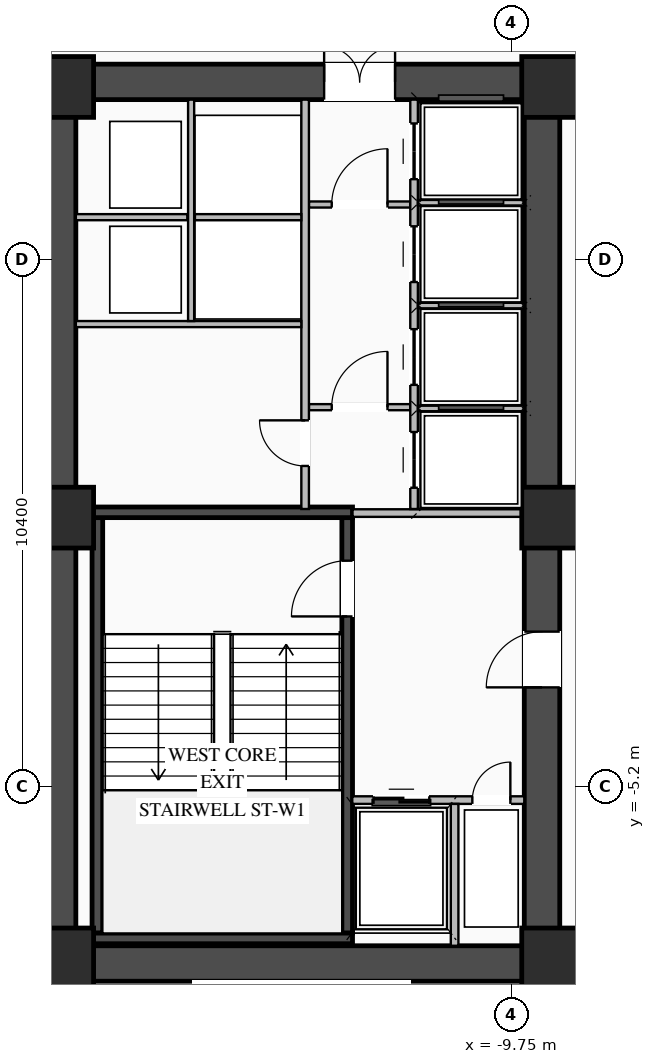
"""IFC4 building model, lengths in metres.
Left out: names, types, materials, properties, quantities, classifications, styles, units other than length and angle.
Written with IfcOpenShell. Run it as: python <this file> out.ifc"""

import sys

from ifc_helpers import new_model, si_unit, direction, frame, frame_2d, origin, origin_2d, place, context, subcontext, project, spatial, rectangle, extrude, element, fill, save


model = new_model("IFC4")
c1 = context("Model", 3, precision=1e-05, world=origin(), true_north=direction((0.0, 1.0)))
c2 = subcontext(c1, "Body", "Model", "MODEL_VIEW")
j1 = project(units=[si_unit("LENGTHUNIT", "METRE"), si_unit("PLANEANGLEUNIT", "RADIAN")], contexts=[c1])
p1 = place(None, origin())
s1 = spatial("IfcSite", under=j1, at=p1, CompositionType="ELEMENT")
p2 = place(p1, origin())
s2 = spatial("IfcBuilding", under=s1, at=p2, CompositionType="ELEMENT")
p3 = place(p2, frame((0.0, 0.0, 22.8)))
s3 = spatial("IfcBuildingStorey", under=s2, at=p3, CompositionType="ELEMENT", Elevation=22.8)
p4 = place(p3, frame((-19.05, -8.7, 0.0), z_axis=(0.0, 0.0, 1.0), x_axis=(1.0, 0.0, 0.0)))
e1 = element("IfcWall", 1, at=p4, inside=s3, PredefinedType="SHEAR", context=c2, shape_type="SweptSolid", body=[
    extrude(rectangle(XDim=10.25, YDim=0.7, at=frame_2d((5.125, 0.0))), origin(), (0.0, 0.0, 1.0), 3.92),
])
p5 = place(p3, frame((-19.05, 8.7, 0.0), z_axis=(0.0, 0.0, 1.0), x_axis=(1.0, 0.0, 0.0)))
e2 = element("IfcWall", 2, at=p5, inside=s3, PredefinedType="SHEAR", context=c2, shape_type="SweptSolid", body=[
    extrude(rectangle(XDim=10.25, YDim=0.7, at=frame_2d((5.125, 0.0))), origin(), (0.0, 0.0, 1.0), 3.92),
])
p6 = place(p5, frame((5.6, 0.0, 0.0)))
e3 = element("IfcOpeningElement", 3, at=p6, cuts=e2, PredefinedType="OPENING", context=c2, shape_type="SweptSolid", body=[
    extrude(rectangle(XDim=1.4, YDim=2.05, at=frame_2d((0.7, 1.025))), frame((0.0, 0.36, 0.0), z_axis=(0.0, -1.0, 0.0), x_axis=(1.0, 0.0, 0.0)), (0.0, 0.0, 1.0), 0.72),
])
p7 = place(p3, frame((-18.7, -8.35, 0.0), z_axis=(0.0, 0.0, 1.0), x_axis=(0.0, 1.0, 0.0)))
e4 = element("IfcWall", 4, at=p7, inside=s3, PredefinedType="SHEAR", context=c2, shape_type="SweptSolid", body=[
    extrude(rectangle(XDim=16.7, YDim=0.7, at=frame_2d((8.35, 0.0))), origin(), (0.0, 0.0, 1.0), 3.92),
])
p8 = place(p3, frame((-9.15, -8.35, 0.0), z_axis=(0.0, 0.0, 1.0), x_axis=(0.0, 1.0, 0.0)))
e5 = element("IfcWall", 5, at=p8, inside=s3, PredefinedType="SHEAR", context=c2, shape_type="SweptSolid", body=[
    extrude(rectangle(XDim=16.7, YDim=0.7, at=frame_2d((8.35, 0.0))), origin(), (0.0, 0.0, 1.0), 3.92),
])
p9 = place(p8, frame((5.1, 0.0, 0.0)))
e6 = element("IfcOpeningElement", 6, at=p9, cuts=e5, PredefinedType="OPENING", context=c2, shape_type="SweptSolid", body=[
    extrude(rectangle(XDim=1.1, YDim=2.08, at=frame_2d((0.55, 1.04))), frame((0.0, 0.36, 0.0), z_axis=(0.0, -1.0, 0.0), x_axis=(1.0, 0.0, 0.0)), (0.0, 0.0, 1.0), 0.72),
])
p10 = place(p3, frame((-12.995, -8.1, 0.0), z_axis=(0.0, 0.0, 1.0), x_axis=(0.0, 1.0, 0.0)))
e7 = element("IfcWall", 7, at=p10, inside=s3, PredefinedType="SHEAR", context=c2, shape_type="SweptSolid", body=[
    extrude(rectangle(XDim=8.2, YDim=0.21, at=frame_2d((4.1, 0.0))), origin(), (0.0, 0.0, 1.0), 3.92),
])
p11 = place(p10, frame((6.25, 0.0, 0.0)))
e8 = element("IfcOpeningElement", 8, at=p11, cuts=e7, PredefinedType="OPENING", context=c2, shape_type="SweptSolid", body=[
    extrude(rectangle(XDim=1.1, YDim=2.15, at=frame_2d((0.55, 1.075))), frame((0.0, 0.115, 0.0), z_axis=(0.0, -1.0, 0.0), x_axis=(1.0, 0.0, 0.0)), (0.0, 0.0, 1.0), 0.23),
])
p12 = place(p3, frame((-17.925, -8.1, 0.0), z_axis=(0.0, 0.0, 1.0), x_axis=(0.0, 1.0, 0.0)))
e9 = element("IfcWall", 9, at=p12, inside=s3, PredefinedType="SHEAR", context=c2, shape_type="SweptSolid", body=[
    extrude(rectangle(XDim=8.2, YDim=0.21, at=frame_2d((4.1, 0.0))), origin(), (0.0, 0.0, 1.0), 3.92),
])
for number, where, z_axis, x_axis in (
    (10, (-18.03, -8.205, 0.0), (0.0, 0.0, 1.0), (1.0, 0.0, 0.0)),
    (11, (-12.89, 0.205, 0.0), (0.0, 0.0, 1.0), (-1.0, 0.0, 0.0)),
):
    element("IfcWall", number, at=place(p3, frame(where, z_axis=z_axis, x_axis=x_axis)), inside=s3, PredefinedType="SHEAR", context=c2, shape_type="SweptSolid", body=[
        extrude(rectangle(XDim=5.14, YDim=0.21, at=frame_2d((2.57, 0.0))), origin(), (0.0, 0.0, 1.0), 3.92),
    ])
for number, where, z_axis, x_axis in (
    (12, (-8.95, -8.6, 0.0), (0.0, 0.0, 1.0), (1.0, 0.0, 0.0)),
    (13, (-8.95, 0.1, 0.0), (0.0, 0.0, 1.0), (1.0, 0.0, 0.0)),
    (14, (-8.95, 8.6, 0.0), (0.0, 0.0, 1.0), (1.0, 0.0, 0.0)),
    (15, (-18.6, -8.6, 0.0), (0.0, 0.0, 1.0), (1.0, 0.0, 0.0)),
    (16, (-18.6, 0.1, 0.0), (0.0, 0.0, 1.0), (1.0, 0.0, 0.0)),
    (17, (-18.6, 8.6, 0.0), (0.0, 0.0, 1.0), (1.0, 0.0, 0.0)),
):
    element("IfcColumn", number, at=place(p3, frame(where, z_axis=z_axis, x_axis=x_axis)), inside=s3, PredefinedType="COLUMN", context=c2, shape_type="SweptSolid", body=[
        extrude(rectangle(XDim=1.2, YDim=1.2, at=origin_2d()), origin(), (0.0, 0.0, 1.0), 4.2),
    ])
p13 = place(p3, frame((-12.895, -5.475, 0.0), z_axis=(0.0, 0.0, 1.0), x_axis=(1.0, 0.0, 0.0)))
e18 = element("IfcWall", 18, at=p13, inside=s3, PredefinedType="STANDARD", context=c2, shape_type="SweptSolid", body=[
    extrude(rectangle(XDim=3.395, YDim=0.15, at=frame_2d((1.698, 0.0))), origin(), (0.0, 0.0, 1.0), 3.9),
])
p14 = place(p13, frame((0.42, 0.0, 0.0)))
e19 = element("IfcOpeningElement", 19, at=p14, cuts=e18, PredefinedType="OPENING", context=c2, shape_type="SweptSolid", body=[
    extrude(rectangle(XDim=1.1, YDim=2.15, at=frame_2d((0.55, 1.075))), frame((0.0, 0.085, 0.0), z_axis=(0.0, -1.0, 0.0), x_axis=(1.0, 0.0, 0.0)), (0.0, 0.0, 1.0), 0.17),
])
p15 = place(p13, frame((2.37, 0.0, 0.0)))
e20 = element("IfcOpeningElement", 20, at=p15, cuts=e18, PredefinedType="OPENING", context=c2, shape_type="SweptSolid", body=[
    extrude(rectangle(XDim=0.75, YDim=2.05, at=frame_2d((0.375, 1.025))), frame((0.0, 0.085, 0.0), z_axis=(0.0, -1.0, 0.0), x_axis=(1.0, 0.0, 0.0)), (0.0, 0.0, 1.0), 0.17),
])
p16 = place(p3, frame((-10.875, -8.35, 0.0), z_axis=(0.0, 0.0, 1.0), x_axis=(0.0, 1.0, 0.0)))
e21 = element("IfcWall", 21, at=p16, inside=s3, PredefinedType="STANDARD", context=c2, shape_type="SweptSolid", body=[
    extrude(rectangle(XDim=2.8, YDim=0.15, at=frame_2d((1.4, 0.0))), origin(), (0.0, 0.0, 1.0), 3.9),
])
p17 = place(p3, frame((-12.89, 0.19, 0.0), z_axis=(0.0, 0.0, 1.0), x_axis=(1.0, 0.0, 0.0)))
e22 = element("IfcWall", 22, at=p17, inside=s3, PredefinedType="STANDARD", context=c2, shape_type="SweptSolid", body=[
    extrude(rectangle(XDim=3.39, YDim=0.15, at=frame_2d((1.695, 0.0))), origin(), (0.0, 0.0, 1.0), 3.295),
])
p18 = place(p3, frame((-13.75, 2.28, 0.0), z_axis=(0.0, 0.0, 1.0), x_axis=(1.0, 0.0, 0.0)))
e23 = element("IfcWall", 23, at=p18, inside=s3, PredefinedType="STANDARD", context=c2, shape_type="SweptSolid", body=[
    extrude(rectangle(XDim=2.0, YDim=0.12, at=frame_2d((1.0, 0.0))), origin(), (0.0, 0.0, 1.0), 3.9),
])
p19 = place(p18, frame((0.45, 0.0, 0.0)))
e24 = element("IfcOpeningElement", 24, at=p19, cuts=e23, PredefinedType="OPENING", context=c2, shape_type="SweptSolid", body=[
    extrude(rectangle(XDim=1.1, YDim=2.1, at=frame_2d((0.55, 1.05))), frame((0.0, 0.07, 0.0), z_axis=(0.0, -1.0, 0.0), x_axis=(1.0, 0.0, 0.0)), (0.0, 0.0, 1.0), 0.14),
])
p20 = place(p3, frame((-13.75, 6.28, 0.0), z_axis=(0.0, 0.0, 1.0), x_axis=(1.0, 0.0, 0.0)))
e25 = element("IfcWall", 25, at=p20, inside=s3, PredefinedType="STANDARD", context=c2, shape_type="SweptSolid", body=[
    extrude(rectangle(XDim=2.0, YDim=0.12, at=frame_2d((1.0, 0.0))), origin(), (0.0, 0.0, 1.0), 3.9),
])
p21 = place(p20, frame((0.45, 0.0, 0.0)))
e26 = element("IfcOpeningElement", 26, at=p21, cuts=e25, PredefinedType="OPENING", context=c2, shape_type="SweptSolid", body=[
    extrude(rectangle(XDim=1.1, YDim=2.1, at=frame_2d((0.55, 1.05))), frame((0.0, 0.07, 0.0), z_axis=(0.0, -1.0, 0.0), x_axis=(1.0, 0.0, 0.0)), (0.0, 0.0, 1.0), 0.14),
])
p22 = place(p3, frame((-11.675, 0.27, 0.0), z_axis=(0.0, 0.0, 1.0), x_axis=(0.0, 1.0, 0.0)))
e27 = element("IfcWall", 27, at=p22, inside=s3, PredefinedType="STANDARD", context=c2, shape_type="SweptSolid", body=[
    extrude(rectangle(XDim=8.08, YDim=0.15, at=frame_2d((4.04, 0.0))), origin(), (0.0, 0.0, 1.0), 3.9),
])
p23 = place(p22, frame((0.42, 0.0, 0.0)))
e28 = element("IfcOpeningElement", 28, at=p23, cuts=e27, PredefinedType="OPENING", context=c2, shape_type="SweptSolid", body=[
    extrude(rectangle(XDim=1.1, YDim=2.1, at=frame_2d((0.55, 1.05))), frame((0.0, 0.085, 0.0), z_axis=(0.0, -1.0, 0.0), x_axis=(1.0, 0.0, 0.0)), (0.0, 0.0, 1.0), 0.17),
])
p24 = place(p22, frame((2.45, 0.0, 0.0)))
e29 = element("IfcOpeningElement", 29, at=p24, cuts=e27, PredefinedType="OPENING", context=c2, shape_type="SweptSolid", body=[
    extrude(rectangle(XDim=1.1, YDim=2.1, at=frame_2d((0.55, 1.05))), frame((0.0, 0.085, 0.0), z_axis=(0.0, -1.0, 0.0), x_axis=(1.0, 0.0, 0.0)), (0.0, 0.0, 1.0), 0.17),
])
p25 = place(p22, frame((4.48, 0.0, 0.0)))
e30 = element("IfcOpeningElement", 30, at=p25, cuts=e27, PredefinedType="OPENING", context=c2, shape_type="SweptSolid", body=[
    extrude(rectangle(XDim=1.1, YDim=2.1, at=frame_2d((0.55, 1.05))), frame((0.0, 0.085, 0.0), z_axis=(0.0, -1.0, 0.0), x_axis=(1.0, 0.0, 0.0)), (0.0, 0.0, 1.0), 0.17),
])
p26 = place(p22, frame((6.51, 0.0, 0.0)))
e31 = element("IfcOpeningElement", 31, at=p26, cuts=e27, PredefinedType="OPENING", context=c2, shape_type="SweptSolid", body=[
    extrude(rectangle(XDim=1.1, YDim=2.1, at=frame_2d((0.55, 1.05))), frame((0.0, 0.085, 0.0), z_axis=(0.0, -1.0, 0.0), x_axis=(1.0, 0.0, 0.0)), (0.0, 0.0, 1.0), 0.17),
])
for number, where, z_axis, x_axis in (
    (32, (-11.6, 2.255, 0.0), (0.0, 0.0, 1.0), (1.0, 0.0, 0.0)),
    (33, (-11.6, 4.285, 0.0), (0.0, 0.0, 1.0), (1.0, 0.0, 0.0)),
    (34, (-11.6, 6.315, 0.0), (0.0, 0.0, 1.0), (1.0, 0.0, 0.0)),
):
    element("IfcWall", number, at=place(p3, frame(where, z_axis=z_axis, x_axis=x_axis)), inside=s3, PredefinedType="STANDARD", context=c2, shape_type="SweptSolid", body=[
        extrude(rectangle(XDim=2.1, YDim=0.11, at=frame_2d((1.05, 0.0))), origin(), (0.0, 0.0, 1.0), 3.9),
    ])
p27 = place(p3, frame((-13.825, 0.27, 0.0), z_axis=(0.0, 0.0, 1.0), x_axis=(0.0, 1.0, 0.0)))
e35 = element("IfcWall", 35, at=p27, inside=s3, PredefinedType="STANDARD", context=c2, shape_type="SweptSolid", body=[
    extrude(rectangle(XDim=8.08, YDim=0.15, at=frame_2d((4.04, 0.0))), origin(), (0.0, 0.0, 1.0), 3.9),
])
p28 = place(p27, frame((0.85, 0.0, 0.0)))
e36 = element("IfcOpeningElement", 36, at=p28, cuts=e35, PredefinedType="OPENING", context=c2, shape_type="SweptSolid", body=[
    extrude(rectangle(XDim=0.9, YDim=2.05, at=frame_2d((0.45, 1.025))), frame((0.0, 0.085, 0.0), z_axis=(0.0, -1.0, 0.0), x_axis=(1.0, 0.0, 0.0)), (0.0, 0.0, 1.0), 0.17),
])
p29 = place(p3, frame((-18.35, 3.92, 0.0), z_axis=(0.0, 0.0, 1.0), x_axis=(1.0, 0.0, 0.0)))
e37 = element("IfcWall", 37, at=p29, inside=s3, PredefinedType="STANDARD", context=c2, shape_type="SweptSolid", body=[
    extrude(rectangle(XDim=4.45, YDim=0.12, at=frame_2d((2.225, 0.0))), origin(), (0.0, 0.0, 1.0), 3.9),
])
p30 = place(p3, frame((-18.35, 6.03, 0.0), z_axis=(0.0, 0.0, 1.0), x_axis=(1.0, 0.0, 0.0)))
e38 = element("IfcWall", 38, at=p30, inside=s3, PredefinedType="STANDARD", context=c2, shape_type="SweptSolid", body=[
    extrude(rectangle(XDim=2.2, YDim=0.12, at=frame_2d((1.1, 0.0))), origin(), (0.0, 0.0, 1.0), 3.9),
])
p31 = place(p3, frame((-16.075, 3.98, 0.0), z_axis=(0.0, 0.0, 1.0), x_axis=(0.0, 1.0, 0.0)))
e39 = element("IfcWall", 39, at=p31, inside=s3, PredefinedType="STANDARD", context=c2, shape_type="SweptSolid", body=[
    extrude(rectangle(XDim=4.37, YDim=0.12, at=frame_2d((2.185, 0.0))), origin(), (0.0, 0.0, 1.0), 3.9),
])
p32 = place(p3, frame((-16.0, 6.03, 0.0), z_axis=(0.0, 0.0, 1.0), x_axis=(1.0, 0.0, 0.0)))
e40 = element("IfcWall", 40, at=p32, inside=s3, PredefinedType="STANDARD", context=c2, shape_type="SweptSolid", body=[
    extrude(rectangle(XDim=2.1, YDim=0.12, at=frame_2d((1.05, 0.0))), origin(), (0.0, 0.0, 1.0), 3.9),
])
p33 = place(p11, origin())
e41 = element("IfcDoor", 41, at=p33, inside=s3, OperationType="SINGLE_SWING_LEFT", PredefinedType="DOOR", context=c2, shape_type="SweptSolid", body=[
    extrude(rectangle(XDim=1.1, YDim=2.15, at=frame_2d((0.55, 1.075))), frame((0.0, 0.025, 0.0), z_axis=(0.0, -1.0, 0.0), x_axis=(1.0, 0.0, 0.0)), (0.0, 0.0, 1.0), 0.05),
])
fill(e8, e41)
p34 = place(p14, origin())
e42 = element("IfcDoor", 42, at=p34, inside=s3, OperationType="DOUBLE_DOOR_SLIDING", PredefinedType="DOOR", context=c2, shape_type="SweptSolid", body=[
    extrude(rectangle(XDim=1.1, YDim=2.15, at=frame_2d((0.55, 1.075))), frame((0.0, 0.025, 0.0), z_axis=(0.0, -1.0, 0.0), x_axis=(1.0, 0.0, 0.0)), (0.0, 0.0, 1.0), 0.05),
])
fill(e19, e42)
p35 = place(p15, origin())
e43 = element("IfcDoor", 43, at=p35, inside=s3, OperationType="SINGLE_SWING_RIGHT", PredefinedType="DOOR", context=c2, shape_type="SweptSolid", body=[
    extrude(rectangle(XDim=0.75, YDim=2.05, at=frame_2d((0.375, 1.025))), frame((0.0, 0.025, 0.0), z_axis=(0.0, -1.0, 0.0), x_axis=(1.0, 0.0, 0.0)), (0.0, 0.0, 1.0), 0.05),
])
fill(e20, e43)
p36 = place(p9, origin())
e44 = element("IfcDoor", 44, at=p36, inside=s3, OperationType="SINGLE_SWING_LEFT", PredefinedType="DOOR", context=c2, shape_type="SweptSolid", body=[
    extrude(rectangle(XDim=1.1, YDim=2.08, at=frame_2d((0.55, 1.04))), frame((0.0, 0.305, 0.0), z_axis=(0.0, -1.0, 0.0), x_axis=(1.0, 0.0, 0.0)), (0.0, 0.0, 1.0), 0.05),
])
fill(e6, e44)
p37 = place(p19, origin())
e45 = element("IfcDoor", 45, at=p37, inside=s3, OperationType="SINGLE_SWING_RIGHT", PredefinedType="DOOR", context=c2, shape_type="SweptSolid", body=[
    extrude(rectangle(XDim=1.1, YDim=2.1, at=frame_2d((0.55, 1.05))), frame((0.0, 0.025, 0.0), z_axis=(0.0, -1.0, 0.0), x_axis=(1.0, 0.0, 0.0)), (0.0, 0.0, 1.0), 0.05),
])
fill(e24, e45)
p38 = place(p21, origin())
e46 = element("IfcDoor", 46, at=p38, inside=s3, OperationType="SINGLE_SWING_RIGHT", PredefinedType="DOOR", context=c2, shape_type="SweptSolid", body=[
    extrude(rectangle(XDim=1.1, YDim=2.1, at=frame_2d((0.55, 1.05))), frame((0.0, 0.025, 0.0), z_axis=(0.0, -1.0, 0.0), x_axis=(1.0, 0.0, 0.0)), (0.0, 0.0, 1.0), 0.05),
])
fill(e26, e46)
p39 = place(p6, origin())
e47 = element("IfcDoor", 47, at=p39, inside=s3, OperationType="DOUBLE_DOOR_SINGLE_SWING", PredefinedType="DOOR", context=c2, shape_type="SweptSolid", body=[
    extrude(rectangle(XDim=1.4, YDim=2.05, at=frame_2d((0.7, 1.025))), frame((0.0, 0.295, 0.0), z_axis=(0.0, -1.0, 0.0), x_axis=(1.0, 0.0, 0.0)), (0.0, 0.0, 1.0), 0.05),
])
fill(e3, e47)
p40 = place(p23, origin())
e48 = element("IfcDoor", 48, at=p40, inside=s3, OperationType="DOUBLE_DOOR_SLIDING", PredefinedType="DOOR", context=c2, shape_type="SweptSolid", body=[
    extrude(rectangle(XDim=1.1, YDim=2.1, at=frame_2d((0.55, 1.05))), frame((0.0, 0.025, 0.0), z_axis=(0.0, -1.0, 0.0), x_axis=(1.0, 0.0, 0.0)), (0.0, 0.0, 1.0), 0.05),
])
fill(e28, e48)
p41 = place(p24, origin())
e49 = element("IfcDoor", 49, at=p41, inside=s3, OperationType="DOUBLE_DOOR_SLIDING", PredefinedType="DOOR", context=c2, shape_type="SweptSolid", body=[
    extrude(rectangle(XDim=1.1, YDim=2.1, at=frame_2d((0.55, 1.05))), frame((0.0, 0.025, 0.0), z_axis=(0.0, -1.0, 0.0), x_axis=(1.0, 0.0, 0.0)), (0.0, 0.0, 1.0), 0.05),
])
fill(e29, e49)
p42 = place(p25, origin())
e50 = element("IfcDoor", 50, at=p42, inside=s3, OperationType="DOUBLE_DOOR_SLIDING", PredefinedType="DOOR", context=c2, shape_type="SweptSolid", body=[
    extrude(rectangle(XDim=1.1, YDim=2.1, at=frame_2d((0.55, 1.05))), frame((0.0, 0.025, 0.0), z_axis=(0.0, -1.0, 0.0), x_axis=(1.0, 0.0, 0.0)), (0.0, 0.0, 1.0), 0.05),
])
fill(e30, e50)
p43 = place(p26, origin())
e51 = element("IfcDoor", 51, at=p43, inside=s3, OperationType="DOUBLE_DOOR_SLIDING", PredefinedType="DOOR", context=c2, shape_type="SweptSolid", body=[
    extrude(rectangle(XDim=1.1, YDim=2.1, at=frame_2d((0.55, 1.05))), frame((0.0, 0.025, 0.0), z_axis=(0.0, -1.0, 0.0), x_axis=(1.0, 0.0, 0.0)), (0.0, 0.0, 1.0), 0.05),
])
fill(e31, e51)
p44 = place(p28, origin())
e52 = element("IfcDoor", 52, at=p44, inside=s3, OperationType="SINGLE_SWING_RIGHT", PredefinedType="DOOR", context=c2, shape_type="SweptSolid", body=[
    extrude(rectangle(XDim=0.9, YDim=2.05, at=frame_2d((0.45, 1.025))), frame((0.0, 0.025, 0.0), z_axis=(0.0, -1.0, 0.0), x_axis=(1.0, 0.0, 0.0)), (0.0, 0.0, 1.0), 0.05),
])
fill(e36, e52)
save(model, sys.argv[1])
